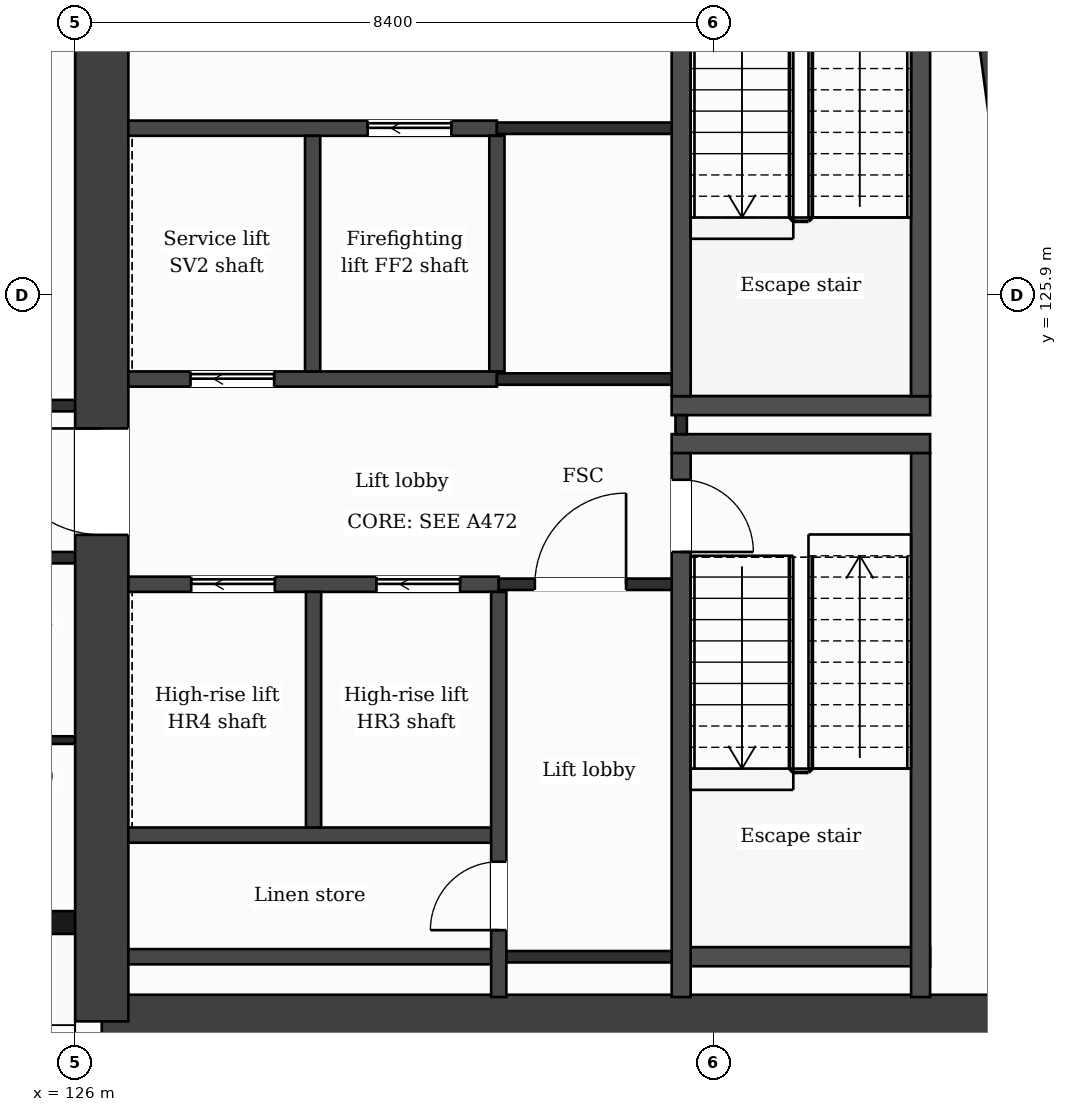
"""IFC4 building model, lengths in metres.
Left out: names, types, materials, properties, quantities, classifications, styles, units other than length and angle.
Written with IfcOpenShell. Run it as: python <this file> out.ifc"""

import sys

from ifc_helpers import new_model, si_unit, direction, frame, frame_2d, origin, place, context, subcontext, project, spatial, rectangle, extrude, element, fill, save


model = new_model("IFC4")
c1 = context("Model", 3, precision=1e-05, world=origin(), true_north=direction((0.0, 1.0)))
c2 = subcontext(c1, "Body", "Model", "MODEL_VIEW")
j1 = project(units=[si_unit("LENGTHUNIT", "METRE"), si_unit("PLANEANGLEUNIT", "RADIAN")], contexts=[c1])
p1 = place(None, origin())
s1 = spatial("IfcSite", under=j1, at=p1, CompositionType="ELEMENT")
p2 = place(p1, origin())
s2 = spatial("IfcBuilding", under=s1, at=p2, CompositionType="ELEMENT")
p3 = place(p2, frame((0.0, 0.0, 292.3)))
s3 = spatial("IfcBuildingStorey", under=s2, at=p3, CompositionType="ELEMENT", Elevation=292.3)
p4 = place(p3, frame((137.863, 132.05, 0.0), z_axis=(0.0, 0.0, 1.0), x_axis=(0.133401241494, -0.991062111458, 0.0)))
e1 = element("IfcWall", 1, at=p4, inside=s3, PredefinedType="SHEAR", context=c2, shape_type="SweptSolid", body=[
    extrude(rectangle(XDim=15.842, YDim=0.7, at=frame_2d((7.921, 0.0))), origin(), (0.0, 0.0, 1.0), 3.7),
])
p5 = place(p3, frame((139.977, 116.35, 0.0), z_axis=(0.0, 0.0, 1.0), x_axis=(-1.0, 0.0, 0.0)))
e2 = element("IfcWall", 2, at=p5, inside=s3, PredefinedType="SHEAR", context=c2, shape_type="SweptSolid", body=[
    extrude(rectangle(XDim=13.626, YDim=0.7, at=frame_2d((6.813, 0.0))), origin(), (0.0, 0.0, 1.0), 3.7),
])
p6 = place(p3, frame((126.35, 116.35, 0.0), z_axis=(0.0, 0.0, 1.0), x_axis=(0.0, 1.0, 0.0)))
e3 = element("IfcWall", 3, at=p6, inside=s3, PredefinedType="SHEAR", context=c2, shape_type="SweptSolid", body=[
    extrude(rectangle(XDim=15.7, YDim=0.7, at=frame_2d((7.85, 0.0))), origin(), (0.0, 0.0, 1.0), 3.7),
])
p7 = place(p6, frame((6.4, 0.0, 0.0)))
e4 = element("IfcOpeningElement", 4, at=p7, cuts=e3, PredefinedType="OPENING", context=c2, shape_type="SweptSolid", body=[
    extrude(rectangle(XDim=1.4, YDim=2.1, at=frame_2d((0.7, 1.05))), frame((0.0, 0.36, 0.0), z_axis=(0.0, -1.0, 0.0), x_axis=(1.0, 0.0, 0.0)), (0.0, 0.0, 1.0), 0.72),
])
p8 = place(p3, frame((100.8, 117.65, 0.0), z_axis=(0.0, 0.0, 1.0), x_axis=(1.0, 0.0, 0.0)))
e5 = element("IfcWall", 5, at=p8, inside=s3, PredefinedType="SOLIDWALL", context=c2, shape_type="SweptSolid", body=[
    extrude(rectangle(XDim=25.2, YDim=0.3, at=frame_2d((12.6, 0.0))), origin(), (0.0, 0.0, 1.0), 3.38),
])
p9 = place(p8, frame((0.95, 0.0, 0.9)))
e6 = element("IfcOpeningElement", 6, at=p9, cuts=e5, PredefinedType="OPENING", context=c2, shape_type="SweptSolid", body=[
    extrude(rectangle(XDim=2.4, YDim=2.1, at=frame_2d((1.2, 1.05))), frame((0.0, 0.16, 0.0), z_axis=(0.0, -1.0, 0.0), x_axis=(1.0, 0.0, 0.0)), (0.0, 0.0, 1.0), 0.32),
])
p10 = place(p8, frame((5.1, 0.0, 0.9)))
e7 = element("IfcOpeningElement", 7, at=p10, cuts=e5, PredefinedType="OPENING", context=c2, shape_type="SweptSolid", body=[
    extrude(rectangle(XDim=2.4, YDim=2.1, at=frame_2d((1.2, 1.05))), frame((0.0, 0.16, 0.0), z_axis=(0.0, -1.0, 0.0), x_axis=(1.0, 0.0, 0.0)), (0.0, 0.0, 1.0), 0.32),
])
p11 = place(p8, frame((9.9, 0.0, 0.0)))
e8 = element("IfcOpeningElement", 8, at=p11, cuts=e5, PredefinedType="OPENING", context=c2, shape_type="SweptSolid", body=[
    extrude(rectangle(XDim=1.2, YDim=2.4, at=frame_2d((0.6, 1.2))), frame((0.0, 0.16, 0.0), z_axis=(0.0, -1.0, 0.0), x_axis=(1.0, 0.0, 0.0)), (0.0, 0.0, 1.0), 0.32),
])
p12 = place(p8, frame((14.1, 0.0, 0.9)))
e9 = element("IfcOpeningElement", 9, at=p12, cuts=e5, PredefinedType="OPENING", context=c2, shape_type="SweptSolid", body=[
    extrude(rectangle(XDim=1.2, YDim=2.1, at=frame_2d((0.6, 1.05))), frame((0.0, 0.16, 0.0), z_axis=(0.0, -1.0, 0.0), x_axis=(1.0, 0.0, 0.0)), (0.0, 0.0, 1.0), 0.32),
])
p13 = place(p8, frame((17.7, 0.0, 0.9)))
e10 = element("IfcOpeningElement", 10, at=p13, cuts=e5, PredefinedType="OPENING", context=c2, shape_type="SweptSolid", body=[
    extrude(rectangle(XDim=2.4, YDim=2.1, at=frame_2d((1.2, 1.05))), frame((0.0, 0.16, 0.0), z_axis=(0.0, -1.0, 0.0), x_axis=(1.0, 0.0, 0.0)), (0.0, 0.0, 1.0), 0.32),
])
p14 = place(p8, frame((21.85, 0.0, 0.9)))
e11 = element("IfcOpeningElement", 11, at=p14, cuts=e5, PredefinedType="OPENING", context=c2, shape_type="SweptSolid", body=[
    extrude(rectangle(XDim=2.4, YDim=2.1, at=frame_2d((1.2, 1.05))), frame((0.0, 0.16, 0.0), z_axis=(0.0, -1.0, 0.0), x_axis=(1.0, 0.0, 0.0)), (0.0, 0.0, 1.0), 0.32),
])
p15 = place(p3, frame((126.7, 117.2, 0.0), z_axis=(0.0, 0.0, 1.0), x_axis=(1.0, 0.0, 0.0)))
e12 = element("IfcWall", 12, at=p15, inside=s3, PredefinedType="PARTITIONING", context=c2, shape_type="SweptSolid", body=[
    extrude(rectangle(XDim=4.873, YDim=0.2, at=frame_2d((2.437, 0.0))), origin(), (0.0, 0.0, 1.0), 3.38),
])
p16 = place(p3, frame((131.573, 117.2, 0.0), z_axis=(0.0, 0.0, 1.0), x_axis=(1.0, 0.0, 0.0)))
e13 = element("IfcWall", 13, at=p16, inside=s3, PredefinedType="PARTITIONING", context=c2, shape_type="SweptSolid", body=[
    extrude(rectangle(XDim=2.4, YDim=0.15, at=frame_2d((1.2, 0.0))), origin(), (0.0, 0.0, 1.0), 3.38),
])
p17 = place(p3, frame((133.973, 117.2, 0.0), z_axis=(0.0, 0.0, 1.0), x_axis=(1.0, 0.0, 0.0)))
e14 = element("IfcWall", 14, at=p17, inside=s3, PredefinedType="PARTITIONING", context=c2, shape_type="SweptSolid", body=[
    extrude(rectangle(XDim=3.275, YDim=0.25, at=frame_2d((1.638, 0.0))), origin(), (0.0, 0.0, 1.0), 3.38),
])
p18 = place(p3, frame((126.7, 118.8, 0.0), z_axis=(0.0, 0.0, 1.0), x_axis=(1.0, 0.0, 0.0)))
e15 = element("IfcWall", 15, at=p18, inside=s3, PredefinedType="PARTITIONING", context=c2, shape_type="SweptSolid", body=[
    extrude(rectangle(XDim=4.873, YDim=0.2, at=frame_2d((2.437, 0.0))), origin(), (0.0, 0.0, 1.0), 3.38),
])
p19 = place(p3, frame((123.25, 120.05, 0.0), z_axis=(0.0, 0.0, 1.0), x_axis=(1.0, 0.0, 0.0)))
e16 = element("IfcWall", 16, at=p19, inside=s3, PredefinedType="PARTITIONING", context=c2, shape_type="SweptSolid", body=[
    extrude(rectangle(XDim=2.75, YDim=0.1, at=frame_2d((1.375, 0.0))), origin(), (0.0, 0.0, 1.0), 3.38),
])
p20 = place(p19, frame((1.0, 0.0, 0.0)))
e17 = element("IfcOpeningElement", 17, at=p20, cuts=e16, PredefinedType="OPENING", context=c2, shape_type="SweptSolid", body=[
    extrude(rectangle(XDim=0.8, YDim=2.1, at=frame_2d((0.4, 1.05))), frame((0.0, 0.06, 0.0), z_axis=(0.0, -1.0, 0.0), x_axis=(1.0, 0.0, 0.0)), (0.0, 0.0, 1.0), 0.12),
])
p21 = place(p3, frame((126.7, 122.1, 0.0), z_axis=(0.0, 0.0, 1.0), x_axis=(1.0, 0.0, 0.0)))
e18 = element("IfcWall", 18, at=p21, inside=s3, PredefinedType="PARTITIONING", context=c2, shape_type="SweptSolid", body=[
    extrude(rectangle(XDim=4.873, YDim=0.2, at=frame_2d((2.437, 0.0))), origin(), (0.0, 0.0, 1.0), 3.38),
])
p22 = place(p21, frame((3.264, 0.0, 0.0)))
e19 = element("IfcOpeningElement", 19, at=p22, cuts=e18, PredefinedType="OPENING", context=c2, shape_type="SweptSolid", body=[
    extrude(rectangle(XDim=1.1, YDim=2.1, at=frame_2d((0.55, 1.05))), frame((0.0, 0.11, 0.0), z_axis=(0.0, -1.0, 0.0), x_axis=(1.0, 0.0, 0.0)), (0.0, 0.0, 1.0), 0.22),
])
p23 = place(p21, frame((0.827, 0.0, 0.0)))
e20 = element("IfcOpeningElement", 20, at=p23, cuts=e18, PredefinedType="OPENING", context=c2, shape_type="SweptSolid", body=[
    extrude(rectangle(XDim=1.1, YDim=2.1, at=frame_2d((0.55, 1.05))), frame((0.0, 0.11, 0.0), z_axis=(0.0, -1.0, 0.0), x_axis=(1.0, 0.0, 0.0)), (0.0, 0.0, 1.0), 0.22),
])
p24 = place(p3, frame((131.573, 122.1, 0.0), z_axis=(0.0, 0.0, 1.0), x_axis=(1.0, 0.0, 0.0)))
e21 = element("IfcWall", 21, at=p24, inside=s3, PredefinedType="PARTITIONING", context=c2, shape_type="SweptSolid", body=[
    extrude(rectangle(XDim=2.4, YDim=0.15, at=frame_2d((1.2, 0.0))), origin(), (0.0, 0.0, 1.0), 3.38),
])
p25 = place(p24, frame((0.475, 0.0, 0.0)))
e22 = element("IfcOpeningElement", 22, at=p25, cuts=e21, PredefinedType="OPENING", context=c2, shape_type="SweptSolid", body=[
    extrude(rectangle(XDim=1.2, YDim=2.1, at=frame_2d((0.6, 1.05))), frame((0.0, 0.085, 0.0), z_axis=(0.0, -1.0, 0.0), x_axis=(1.0, 0.0, 0.0)), (0.0, 0.0, 1.0), 0.17),
])
p26 = place(p3, frame((100.8, 122.45, 0.0), z_axis=(0.0, 0.0, 1.0), x_axis=(1.0, 0.0, 0.0)))
e23 = element("IfcWall", 23, at=p26, inside=s3, PredefinedType="PARTITIONING", context=c2, shape_type="SweptSolid", body=[
    extrude(rectangle(XDim=25.2, YDim=0.15, at=frame_2d((12.6, 0.0))), origin(), (0.0, 0.0, 1.0), 3.38),
])
p27 = place(p26, frame((1.6, 0.0, 0.0)))
e24 = element("IfcOpeningElement", 24, at=p27, cuts=e23, PredefinedType="OPENING", context=c2, shape_type="SweptSolid", body=[
    extrude(rectangle(XDim=1.0, YDim=2.1, at=frame_2d((0.5, 1.05))), frame((0.0, 0.085, 0.0), z_axis=(0.0, -1.0, 0.0), x_axis=(1.0, 0.0, 0.0)), (0.0, 0.0, 1.0), 0.17),
])
p28 = place(p26, frame((11.12, 0.0, 0.0)))
e25 = element("IfcOpeningElement", 25, at=p28, cuts=e23, PredefinedType="OPENING", context=c2, shape_type="SweptSolid", body=[
    extrude(rectangle(XDim=0.95, YDim=2.1, at=frame_2d((0.475, 1.05))), frame((0.0, 0.085, 0.0), z_axis=(0.0, -1.0, 0.0), x_axis=(1.0, 0.0, 0.0)), (0.0, 0.0, 1.0), 0.17),
])
p29 = place(p26, frame((13.05, 0.0, 0.0)))
e26 = element("IfcOpeningElement", 26, at=p29, cuts=e23, PredefinedType="OPENING", context=c2, shape_type="SweptSolid", body=[
    extrude(rectangle(XDim=1.0, YDim=2.1, at=frame_2d((0.5, 1.05))), frame((0.0, 0.085, 0.0), z_axis=(0.0, -1.0, 0.0), x_axis=(1.0, 0.0, 0.0)), (0.0, 0.0, 1.0), 0.17),
])
p30 = place(p26, frame((19.61, 0.0, 0.0)))
e27 = element("IfcOpeningElement", 27, at=p30, cuts=e23, PredefinedType="OPENING", context=c2, shape_type="SweptSolid", body=[
    extrude(rectangle(XDim=0.95, YDim=2.1, at=frame_2d((0.475, 1.05))), frame((0.0, 0.085, 0.0), z_axis=(0.0, -1.0, 0.0), x_axis=(1.0, 0.0, 0.0)), (0.0, 0.0, 1.0), 0.17),
])
p31 = place(p26, frame((21.275, 0.0, 0.0)))
e28 = element("IfcOpeningElement", 28, at=p31, cuts=e23, PredefinedType="OPENING", context=c2, shape_type="SweptSolid", body=[
    extrude(rectangle(XDim=0.95, YDim=2.1, at=frame_2d((0.475, 1.05))), frame((0.0, 0.085, 0.0), z_axis=(0.0, -1.0, 0.0), x_axis=(1.0, 0.0, 0.0)), (0.0, 0.0, 1.0), 0.17),
])
for number, where, z_axis, x_axis in (
    (29, (133.848, 123.95, 0.0), (0.0, 0.0, 1.0), (1.0, 0.0, 0.0)),
    (30, (133.848, 124.45, 0.0), (0.0, 0.0, 1.0), (1.0, 0.0, 0.0)),
):
    element("IfcWall", number, at=place(p3, frame(where, z_axis=z_axis, x_axis=x_axis)), inside=s3, PredefinedType="PARTITIONING", context=c2, shape_type="SweptSolid", body=[
        extrude(rectangle(XDim=3.4, YDim=0.25, at=frame_2d((1.7, 0.0))), origin(), (0.0, 0.0, 1.0), 3.38),
    ])
p32 = place(p3, frame((100.8, 124.45, 0.0), z_axis=(0.0, 0.0, 1.0), x_axis=(1.0, 0.0, 0.0)))
e31 = element("IfcWall", 31, at=p32, inside=s3, PredefinedType="PARTITIONING", context=c2, shape_type="SweptSolid", body=[
    extrude(rectangle(XDim=25.2, YDim=0.15, at=frame_2d((12.6, 0.0))), origin(), (0.0, 0.0, 1.0), 3.38),
])
p33 = place(p32, frame((1.85, 0.0, 0.0)))
e32 = element("IfcOpeningElement", 32, at=p33, cuts=e31, PredefinedType="OPENING", context=c2, shape_type="SweptSolid", body=[
    extrude(rectangle(XDim=1.0, YDim=2.1, at=frame_2d((0.5, 1.05))), frame((0.0, 0.085, 0.0), z_axis=(0.0, -1.0, 0.0), x_axis=(1.0, 0.0, 0.0)), (0.0, 0.0, 1.0), 0.17),
])
p34 = place(p32, frame((6.425, 0.0, 0.0)))
e33 = element("IfcOpeningElement", 33, at=p34, cuts=e31, PredefinedType="OPENING", context=c2, shape_type="SweptSolid", body=[
    extrude(rectangle(XDim=1.0, YDim=2.1, at=frame_2d((0.5, 1.05))), frame((0.0, 0.085, 0.0), z_axis=(0.0, -1.0, 0.0), x_axis=(1.0, 0.0, 0.0)), (0.0, 0.0, 1.0), 0.17),
])
p35 = place(p32, frame((9.4, 0.0, 0.0)))
e34 = element("IfcOpeningElement", 34, at=p35, cuts=e31, PredefinedType="OPENING", context=c2, shape_type="SweptSolid", body=[
    extrude(rectangle(XDim=1.0, YDim=2.1, at=frame_2d((0.5, 1.05))), frame((0.0, 0.085, 0.0), z_axis=(0.0, -1.0, 0.0), x_axis=(1.0, 0.0, 0.0)), (0.0, 0.0, 1.0), 0.17),
])
p36 = place(p32, frame((14.825, 0.0, 0.0)))
e35 = element("IfcOpeningElement", 35, at=p36, cuts=e31, PredefinedType="OPENING", context=c2, shape_type="SweptSolid", body=[
    extrude(rectangle(XDim=1.0, YDim=2.1, at=frame_2d((0.5, 1.05))), frame((0.0, 0.085, 0.0), z_axis=(0.0, -1.0, 0.0), x_axis=(1.0, 0.0, 0.0)), (0.0, 0.0, 1.0), 0.17),
])
p37 = place(p32, frame((18.825, 0.0, 0.0)))
e36 = element("IfcOpeningElement", 36, at=p37, cuts=e31, PredefinedType="OPENING", context=c2, shape_type="SweptSolid", body=[
    extrude(rectangle(XDim=1.0, YDim=2.1, at=frame_2d((0.5, 1.05))), frame((0.0, 0.085, 0.0), z_axis=(0.0, -1.0, 0.0), x_axis=(1.0, 0.0, 0.0)), (0.0, 0.0, 1.0), 0.17),
])
p38 = place(p3, frame((126.7, 124.8, 0.0), z_axis=(0.0, 0.0, 1.0), x_axis=(1.0, 0.0, 0.0)))
e37 = element("IfcWall", 37, at=p38, inside=s3, PredefinedType="PARTITIONING", context=c2, shape_type="SweptSolid", body=[
    extrude(rectangle(XDim=4.849, YDim=0.2, at=frame_2d((2.424, 0.0))), origin(), (0.0, 0.0, 1.0), 3.38),
])
p39 = place(p38, frame((0.818, 0.0, 0.0)))
e38 = element("IfcOpeningElement", 38, at=p39, cuts=e37, PredefinedType="OPENING", context=c2, shape_type="SweptSolid", body=[
    extrude(rectangle(XDim=1.1, YDim=2.1, at=frame_2d((0.55, 1.05))), frame((0.0, 0.11, 0.0), z_axis=(0.0, -1.0, 0.0), x_axis=(1.0, 0.0, 0.0)), (0.0, 0.0, 1.0), 0.22),
])
p40 = place(p3, frame((131.549, 124.8, 0.0), z_axis=(0.0, 0.0, 1.0), x_axis=(1.0, 0.0, 0.0)))
e39 = element("IfcWall", 39, at=p40, inside=s3, PredefinedType="PARTITIONING", context=c2, shape_type="SweptSolid", body=[
    extrude(rectangle(XDim=2.549, YDim=0.15, at=frame_2d((1.275, 0.0))), origin(), (0.0, 0.0, 1.0), 3.38),
])
p41 = place(p3, frame((126.7, 128.1, 0.0), z_axis=(0.0, 0.0, 1.0), x_axis=(1.0, 0.0, 0.0)))
e40 = element("IfcWall", 40, at=p41, inside=s3, PredefinedType="PARTITIONING", context=c2, shape_type="SweptSolid", body=[
    extrude(rectangle(XDim=4.849, YDim=0.2, at=frame_2d((2.424, 0.0))), origin(), (0.0, 0.0, 1.0), 3.38),
])
p42 = place(p41, frame((3.149, 0.0, 0.0)))
e41 = element("IfcOpeningElement", 41, at=p42, cuts=e40, PredefinedType="OPENING", context=c2, shape_type="SweptSolid", body=[
    extrude(rectangle(XDim=1.1, YDim=2.1, at=frame_2d((0.55, 1.05))), frame((0.0, 0.11, 0.0), z_axis=(0.0, -1.0, 0.0), x_axis=(1.0, 0.0, 0.0)), (0.0, 0.0, 1.0), 0.22),
])
p43 = place(p3, frame((131.549, 128.1, 0.0), z_axis=(0.0, 0.0, 1.0), x_axis=(1.0, 0.0, 0.0)))
e42 = element("IfcWall", 42, at=p43, inside=s3, PredefinedType="PARTITIONING", context=c2, shape_type="SweptSolid", body=[
    extrude(rectangle(XDim=2.424, YDim=0.15, at=frame_2d((1.212, 0.0))), origin(), (0.0, 0.0, 1.0), 3.38),
])
for number, where, z_axis, x_axis in (
    (43, (129.124, 124.9, 0.0), (0.0, 0.0, 1.0), (0.0, 1.0, 0.0)),
    (44, (129.136, 118.9, 0.0), (0.0, 0.0, 1.0), (0.0, 1.0, 0.0)),
    (45, (131.549, 124.9, 0.0), (0.0, 0.0, 1.0), (0.0, 1.0, 0.0)),
):
    element("IfcWall", number, at=place(p3, frame(where, z_axis=z_axis, x_axis=x_axis)), inside=s3, PredefinedType="PARTITIONING", context=c2, shape_type="SweptSolid", body=[
        extrude(rectangle(XDim=3.1, YDim=0.2, at=frame_2d((1.55, 0.0))), origin(), (0.0, 0.0, 1.0), 3.38),
    ])
p44 = place(p3, frame((131.573, 116.67, 0.0), z_axis=(0.0, 0.0, 1.0), x_axis=(0.0, 1.0, 0.0)))
e46 = element("IfcWall", 46, at=p44, inside=s3, PredefinedType="PARTITIONING", context=c2, shape_type="SweptSolid", body=[
    extrude(rectangle(XDim=5.33, YDim=0.2, at=frame_2d((2.665, 0.0))), origin(), (0.0, 0.0, 1.0), 3.38),
])
p45 = place(p44, frame((0.88, 0.0, 0.0)))
e47 = element("IfcOpeningElement", 47, at=p45, cuts=e46, PredefinedType="OPENING", context=c2, shape_type="SweptSolid", body=[
    extrude(rectangle(XDim=0.9, YDim=2.1, at=frame_2d((0.45, 1.05))), frame((0.0, 0.11, 0.0), z_axis=(0.0, -1.0, 0.0), x_axis=(1.0, 0.0, 0.0)), (0.0, 0.0, 1.0), 0.22),
])
p46 = place(p3, frame((133.973, 124.075, 0.0), z_axis=(0.0, 0.0, 1.0), x_axis=(0.0, 1.0, 0.0)))
e48 = element("IfcWall", 48, at=p46, inside=s3, PredefinedType="PARTITIONING", context=c2, shape_type="SweptSolid", body=[
    extrude(rectangle(XDim=0.25, YDim=0.15, at=frame_2d((0.125, 0.0))), origin(), (0.0, 0.0, 1.0), 3.38),
])
p47 = place(p3, frame((133.973, 116.67, 0.0), z_axis=(0.0, 0.0, 1.0), x_axis=(0.0, 1.0, 0.0)))
e49 = element("IfcWall", 49, at=p47, inside=s3, PredefinedType="PARTITIONING", context=c2, shape_type="SweptSolid", body=[
    extrude(rectangle(XDim=7.155, YDim=0.25, at=frame_2d((3.578, 0.0))), origin(), (0.0, 0.0, 1.0), 3.38),
])
p48 = place(p47, frame((5.855, 0.0, 0.0)))
e50 = element("IfcOpeningElement", 50, at=p48, cuts=e49, PredefinedType="OPENING", context=c2, shape_type="SweptSolid", body=[
    extrude(rectangle(XDim=0.95, YDim=2.1, at=frame_2d((0.475, 1.05))), frame((0.0, 0.135, 0.0), z_axis=(0.0, -1.0, 0.0), x_axis=(1.0, 0.0, 0.0)), (0.0, 0.0, 1.0), 0.27),
])
p49 = place(p3, frame((133.973, 124.575, 0.0), z_axis=(0.0, 0.0, 1.0), x_axis=(0.0, 1.0, 0.0)))
e51 = element("IfcWall", 51, at=p49, inside=s3, PredefinedType="PARTITIONING", context=c2, shape_type="SweptSolid", body=[
    extrude(rectangle(XDim=7.155, YDim=0.25, at=frame_2d((3.578, 0.0))), origin(), (0.0, 0.0, 1.0), 3.38),
])
p50 = place(p49, frame((5.325, 0.0, 0.0)))
e52 = element("IfcOpeningElement", 52, at=p50, cuts=e51, PredefinedType="OPENING", context=c2, shape_type="SweptSolid", body=[
    extrude(rectangle(XDim=1.0, YDim=2.1, at=frame_2d((0.5, 1.05))), frame((0.0, 0.135, 0.0), z_axis=(0.0, -1.0, 0.0), x_axis=(1.0, 0.0, 0.0)), (0.0, 0.0, 1.0), 0.27),
])
for number, where, z_axis, x_axis in (
    (53, (137.123, 116.67, 0.0), (0.0, 0.0, 1.0), (0.0, 1.0, 0.0)),
    (54, (137.123, 124.575, 0.0), (0.0, 0.0, 1.0), (0.0, 1.0, 0.0)),
):
    element("IfcWall", number, at=place(p3, frame(where, z_axis=z_axis, x_axis=x_axis)), inside=s3, PredefinedType="PARTITIONING", context=c2, shape_type="SweptSolid", body=[
        extrude(rectangle(XDim=7.155, YDim=0.25, at=frame_2d((3.578, 0.0))), origin(), (0.0, 0.0, 1.0), 3.38),
    ])
p51 = place(p25, origin())
e55 = element("IfcDoor", 55, at=p51, inside=s3, OperationType="SINGLE_SWING_RIGHT", PredefinedType="DOOR", context=c2, shape_type="SweptSolid", body=[
    extrude(rectangle(XDim=1.2, YDim=2.1, at=frame_2d((0.6, 1.05))), frame((0.0, 0.025, 0.0), z_axis=(0.0, -1.0, 0.0), x_axis=(1.0, 0.0, 0.0)), (0.0, 0.0, 1.0), 0.05),
])
fill(e22, e55)
p52 = place(p22, origin())
e56 = element("IfcDoor", 56, at=p52, inside=s3, OperationType="SLIDING_TO_LEFT", PredefinedType="DOOR", context=c2, shape_type="SweptSolid", body=[
    extrude(rectangle(XDim=1.1, YDim=2.1, at=frame_2d((0.55, 1.05))), frame((0.0, 0.025, 0.0), z_axis=(0.0, -1.0, 0.0), x_axis=(1.0, 0.0, 0.0)), (0.0, 0.0, 1.0), 0.05),
])
fill(e19, e56)
p53 = place(p23, origin())
e57 = element("IfcDoor", 57, at=p53, inside=s3, OperationType="SLIDING_TO_LEFT", PredefinedType="DOOR", context=c2, shape_type="SweptSolid", body=[
    extrude(rectangle(XDim=1.1, YDim=2.1, at=frame_2d((0.55, 1.05))), frame((0.0, 0.025, 0.0), z_axis=(0.0, -1.0, 0.0), x_axis=(1.0, 0.0, 0.0)), (0.0, 0.0, 1.0), 0.05),
])
fill(e20, e57)
p54 = place(p42, origin())
e58 = element("IfcDoor", 58, at=p54, inside=s3, OperationType="SLIDING_TO_LEFT", PredefinedType="DOOR", context=c2, shape_type="SweptSolid", body=[
    extrude(rectangle(XDim=1.1, YDim=2.1, at=frame_2d((0.55, 1.05))), frame((0.0, 0.025, 0.0), z_axis=(0.0, -1.0, 0.0), x_axis=(1.0, 0.0, 0.0)), (0.0, 0.0, 1.0), 0.05),
])
fill(e41, e58)
p55 = place(p39, origin())
e59 = element("IfcDoor", 59, at=p55, inside=s3, OperationType="SLIDING_TO_LEFT", PredefinedType="DOOR", context=c2, shape_type="SweptSolid", body=[
    extrude(rectangle(XDim=1.1, YDim=2.1, at=frame_2d((0.55, 1.05))), frame((0.0, 0.025, 0.0), z_axis=(0.0, -1.0, 0.0), x_axis=(1.0, 0.0, 0.0)), (0.0, 0.0, 1.0), 0.05),
])
fill(e38, e59)
p56 = place(p48, origin())
e60 = element("IfcDoor", 60, at=p56, inside=s3, OperationType="SINGLE_SWING_LEFT", PredefinedType="DOOR", context=c2, shape_type="SweptSolid", body=[
    extrude(rectangle(XDim=0.95, YDim=2.1, at=frame_2d((0.475, 1.05))), frame((0.0, 0.025, 0.0), z_axis=(0.0, -1.0, 0.0), x_axis=(1.0, 0.0, 0.0)), (0.0, 0.0, 1.0), 0.05),
])
fill(e50, e60)
p57 = place(p45, origin())
e61 = element("IfcDoor", 61, at=p57, inside=s3, OperationType="SINGLE_SWING_LEFT", PredefinedType="DOOR", context=c2, shape_type="SweptSolid", body=[
    extrude(rectangle(XDim=0.9, YDim=2.1, at=frame_2d((0.45, 1.05))), frame((0.0, 0.025, 0.0), z_axis=(0.0, -1.0, 0.0), x_axis=(1.0, 0.0, 0.0)), (0.0, 0.0, 1.0), 0.05),
])
fill(e47, e61)
p58 = place(p7, origin())
e62 = element("IfcDoor", 62, at=p58, inside=s3, OperationType="SINGLE_SWING_RIGHT", PredefinedType="DOOR", context=c2, shape_type="SweptSolid", body=[
    extrude(rectangle(XDim=1.4, YDim=2.1, at=frame_2d((0.7, 1.05))), frame((0.0, 0.025, 0.0), z_axis=(0.0, -1.0, 0.0), x_axis=(1.0, 0.0, 0.0)), (0.0, 0.0, 1.0), 0.05),
])
fill(e4, e62)
save(model, sys.argv[1])
